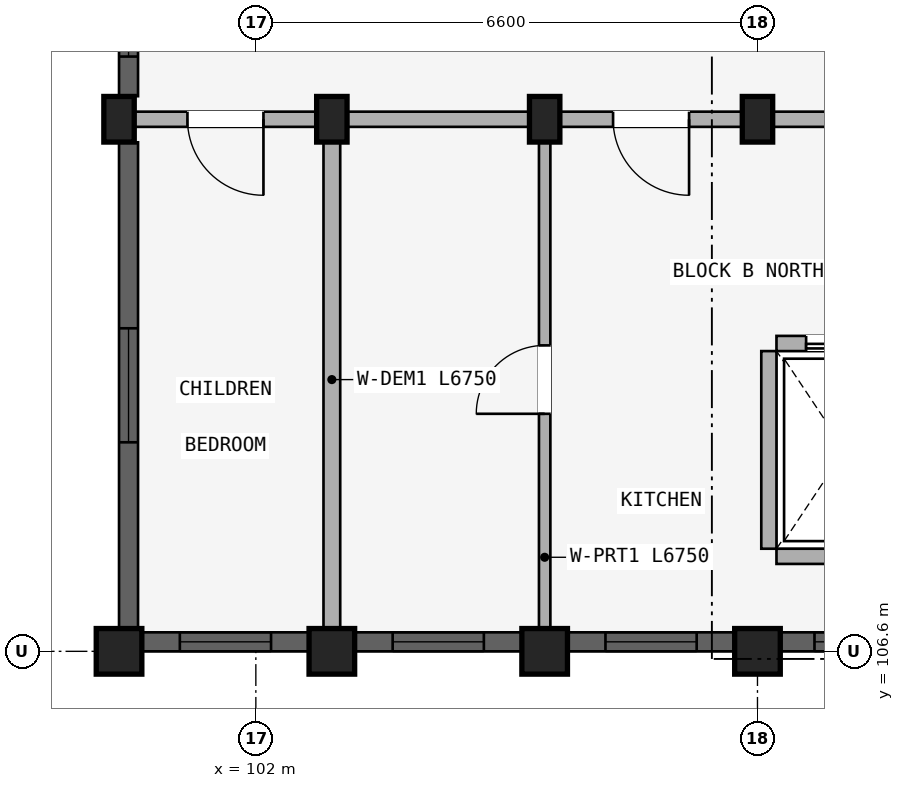
"""IFC4 building model, lengths in metres.
Left out: names, types, materials, properties, quantities, classifications, styles, units other than length and angle.
Written with IfcOpenShell. Run it as: python <this file> out.ifc"""

import sys

from ifc_helpers import new_model, si_unit, direction, frame, frame_2d, origin, origin_2d, place, context, subcontext, project, spatial, rectangle, extrude, element, fill, save


model = new_model("IFC4")
c1 = context("Model", 3, precision=1e-05, world=origin(), true_north=direction((0.0, 1.0)))
c2 = subcontext(c1, "Body", "Model", "MODEL_VIEW")
j1 = project(units=[si_unit("LENGTHUNIT", "METRE"), si_unit("PLANEANGLEUNIT", "RADIAN")], contexts=[c1])
p1 = place(None, origin())
s1 = spatial("IfcSite", under=j1, at=p1, CompositionType="ELEMENT")
p2 = place(p1, origin())
s2 = spatial("IfcBuilding", under=s1, at=p2, CompositionType="ELEMENT")
p3 = place(p2, frame((0.0, 0.0, 40.2)))
s3 = spatial("IfcBuildingStorey", under=s2, at=p3, CompositionType="ELEMENT", Elevation=40.2)
p4 = place(p3, frame((108.6, 106.6, 0.0), z_axis=(0.0, 0.0, 1.0), x_axis=(1.0, 0.0, 0.0)))
e1 = element("IfcColumn", 1, at=p4, inside=s3, PredefinedType="COLUMN", context=c2, shape_type="SweptSolid", body=[
    extrude(rectangle(XDim=0.6, YDim=0.6, at=origin_2d()), origin(), (0.0, 0.0, 1.0), 2.91),
])
p5 = place(p3, frame((108.6, 113.6, 0.0), z_axis=(0.0, 0.0, 1.0), x_axis=(1.0, 0.0, 0.0)))
e2 = element("IfcColumn", 2, at=p5, inside=s3, PredefinedType="COLUMN", context=c2, shape_type="SweptSolid", body=[
    extrude(rectangle(XDim=0.4, YDim=0.6, at=origin_2d()), origin(), (0.0, 0.0, 1.0), 2.91),
])
p6 = place(p3, frame((105.8, 106.6, 0.0), z_axis=(0.0, 0.0, 1.0), x_axis=(1.0, 0.0, 0.0)))
e3 = element("IfcColumn", 3, at=p6, inside=s3, PredefinedType="COLUMN", context=c2, shape_type="SweptSolid", body=[
    extrude(rectangle(XDim=0.6, YDim=0.6, at=origin_2d()), origin(), (0.0, 0.0, 1.0), 2.91),
])
p7 = place(p3, frame((105.8, 113.6, 0.0), z_axis=(0.0, 0.0, 1.0), x_axis=(1.0, 0.0, 0.0)))
e4 = element("IfcColumn", 4, at=p7, inside=s3, PredefinedType="COLUMN", context=c2, shape_type="SweptSolid", body=[
    extrude(rectangle(XDim=0.4, YDim=0.6, at=origin_2d()), origin(), (0.0, 0.0, 1.0), 2.91),
])
p8 = place(p3, frame((103.0, 106.6, 0.0), z_axis=(0.0, 0.0, 1.0), x_axis=(1.0, 0.0, 0.0)))
e5 = element("IfcColumn", 5, at=p8, inside=s3, PredefinedType="COLUMN", context=c2, shape_type="SweptSolid", body=[
    extrude(rectangle(XDim=0.6, YDim=0.6, at=origin_2d()), origin(), (0.0, 0.0, 1.0), 2.91),
])
p9 = place(p3, frame((103.0, 113.6, 0.0), z_axis=(0.0, 0.0, 1.0), x_axis=(1.0, 0.0, 0.0)))
e6 = element("IfcColumn", 6, at=p9, inside=s3, PredefinedType="COLUMN", context=c2, shape_type="SweptSolid", body=[
    extrude(rectangle(XDim=0.4, YDim=0.6, at=origin_2d()), origin(), (0.0, 0.0, 1.0), 2.91),
])
p10 = place(p3, frame((100.2, 106.6, 0.0), z_axis=(0.0, 0.0, 1.0), x_axis=(1.0, 0.0, 0.0)))
e7 = element("IfcColumn", 7, at=p10, inside=s3, PredefinedType="COLUMN", context=c2, shape_type="SweptSolid", body=[
    extrude(rectangle(XDim=0.6, YDim=0.6, at=origin_2d()), origin(), (0.0, 0.0, 1.0), 2.91),
])
p11 = place(p3, frame((100.2, 113.6, 0.0), z_axis=(0.0, 0.0, 1.0), x_axis=(1.0, 0.0, 0.0)))
e8 = element("IfcColumn", 8, at=p11, inside=s3, PredefinedType="COLUMN", context=c2, shape_type="SweptSolid", body=[
    extrude(rectangle(XDim=0.4, YDim=0.6, at=origin_2d()), origin(), (0.0, 0.0, 1.0), 2.91),
])
p12 = place(p3, frame((108.75, 107.95, 0.0), z_axis=(0.0, 0.0, 1.0), x_axis=(0.0, 1.0, 0.0)))
e9 = element("IfcWall", 9, at=p12, inside=s3, PredefinedType="STANDARD", context=c2, shape_type="SweptSolid", body=[
    extrude(rectangle(XDim=2.6, YDim=0.2, at=frame_2d((1.3, 0.0))), origin(), (0.0, 0.0, 1.0), 2.352),
])
p13 = place(p3, frame((110.65, 107.85, 0.0), z_axis=(0.0, 0.0, 1.0), x_axis=(-1.0, 0.0, 0.0)))
e10 = element("IfcWall", 10, at=p13, inside=s3, PredefinedType="STANDARD", context=c2, shape_type="SweptSolid", body=[
    extrude(rectangle(XDim=1.8, YDim=0.2, at=frame_2d((0.9, 0.0))), origin(), (0.0, 0.0, 1.0), 2.91),
])
p14 = place(p3, frame((110.65, 110.65, 0.0), z_axis=(0.0, 0.0, 1.0), x_axis=(-1.0, 0.0, 0.0)))
e11 = element("IfcWall", 11, at=p14, inside=s3, PredefinedType="STANDARD", context=c2, shape_type="SweptSolid", body=[
    extrude(rectangle(XDim=1.8, YDim=0.2, at=frame_2d((0.9, 0.0))), origin(), (0.0, 0.0, 1.0), 2.91),
])
p15 = place(p14, frame((0.39, 0.0, 0.0)))
e12 = element("IfcOpeningElement", 12, at=p15, cuts=e11, PredefinedType="OPENING", context=c2, shape_type="SweptSolid", body=[
    extrude(rectangle(XDim=1.02, YDim=2.15, at=frame_2d((0.51, 1.075))), frame((0.0, 0.11, 0.0), z_axis=(0.0, -1.0, 0.0), x_axis=(1.0, 0.0, 0.0)), (0.0, 0.0, 1.0), 0.22),
])
p16 = place(p3, frame((114.25, 113.6, 0.0), z_axis=(0.0, 0.0, 1.0), x_axis=(-1.0, 0.0, 0.0)))
e13 = element("IfcWall", 13, at=p16, inside=s3, PredefinedType="STANDARD", context=c2, shape_type="SweptSolid", body=[
    extrude(rectangle(XDim=5.6, YDim=0.2, at=frame_2d((2.8, 0.0))), origin(), (0.0, 0.0, 1.0), 2.352),
])
p17 = place(p16, frame((1.91, 0.0, 0.0)))
e14 = element("IfcOpeningElement", 14, at=p17, cuts=e13, PredefinedType="OPENING", context=c2, shape_type="SweptSolid", body=[
    extrude(rectangle(XDim=1.22, YDim=2.15, at=frame_2d((0.61, 1.075))), frame((0.0, 0.11, 0.0), z_axis=(0.0, -1.0, 0.0), x_axis=(1.0, 0.0, 0.0)), (0.0, 0.0, 1.0), 0.22),
])
p18 = place(p3, frame((108.6, 113.6, 0.0), z_axis=(0.0, 0.0, 1.0), x_axis=(-1.0, 0.0, 0.0)))
e15 = element("IfcWall", 15, at=p18, inside=s3, PredefinedType="STANDARD", context=c2, shape_type="SweptSolid", body=[
    extrude(rectangle(XDim=2.8, YDim=0.2, at=frame_2d((1.4, 0.0))), origin(), (0.0, 0.0, 1.0), 2.352),
])
p19 = place(p18, frame((0.9, 0.0, 0.0)))
e16 = element("IfcOpeningElement", 16, at=p19, cuts=e15, PredefinedType="OPENING", context=c2, shape_type="SweptSolid", body=[
    extrude(rectangle(XDim=1.0, YDim=2.15, at=frame_2d((0.5, 1.075))), frame((0.0, 0.11, 0.0), z_axis=(0.0, -1.0, 0.0), x_axis=(1.0, 0.0, 0.0)), (0.0, 0.0, 1.0), 0.22),
])
p20 = place(p3, frame((105.8, 113.6, 0.0), z_axis=(0.0, 0.0, 1.0), x_axis=(-1.0, 0.0, 0.0)))
e17 = element("IfcWall", 17, at=p20, inside=s3, PredefinedType="STANDARD", context=c2, shape_type="SweptSolid", body=[
    extrude(rectangle(XDim=2.8, YDim=0.2, at=frame_2d((1.4, 0.0))), origin(), (0.0, 0.0, 1.0), 2.352),
])
p21 = place(p3, frame((103.0, 113.6, 0.0), z_axis=(0.0, 0.0, 1.0), x_axis=(-1.0, 0.0, 0.0)))
e18 = element("IfcWall", 18, at=p21, inside=s3, PredefinedType="STANDARD", context=c2, shape_type="SweptSolid", body=[
    extrude(rectangle(XDim=2.8, YDim=0.2, at=frame_2d((1.4, 0.0))), origin(), (0.0, 0.0, 1.0), 2.352),
])
p22 = place(p21, frame((0.9, 0.0, 0.0)))
e19 = element("IfcOpeningElement", 19, at=p22, cuts=e18, PredefinedType="OPENING", context=c2, shape_type="SweptSolid", body=[
    extrude(rectangle(XDim=1.0, YDim=2.15, at=frame_2d((0.5, 1.075))), frame((0.0, 0.11, 0.0), z_axis=(0.0, -1.0, 0.0), x_axis=(1.0, 0.0, 0.0)), (0.0, 0.0, 1.0), 0.22),
])
p23 = place(p3, frame((105.8, 106.8, 0.0), z_axis=(0.0, 0.0, 1.0), x_axis=(0.0, 1.0, 0.0)))
e20 = element("IfcWall", 20, at=p23, inside=s3, PredefinedType="PARTITIONING", context=c2, shape_type="SweptSolid", body=[
    extrude(rectangle(XDim=6.75, YDim=0.15, at=frame_2d((3.375, 0.0))), origin(), (0.0, 0.0, 1.0), 2.352),
])
p24 = place(p23, frame((2.925, 0.0, 0.0)))
e21 = element("IfcOpeningElement", 21, at=p24, cuts=e20, PredefinedType="OPENING", context=c2, shape_type="SweptSolid", body=[
    extrude(rectangle(XDim=0.9, YDim=2.1, at=frame_2d((0.45, 1.05))), frame((0.0, 0.085, 0.0), z_axis=(0.0, -1.0, 0.0), x_axis=(1.0, 0.0, 0.0)), (0.0, 0.0, 1.0), 0.17),
])
p25 = place(p3, frame((103.0, 106.8, 0.0), z_axis=(0.0, 0.0, 1.0), x_axis=(0.0, 1.0, 0.0)))
e22 = element("IfcWall", 22, at=p25, inside=s3, PredefinedType="STANDARD", context=c2, shape_type="SweptSolid", body=[
    extrude(rectangle(XDim=6.75, YDim=0.22, at=frame_2d((3.375, 0.0))), origin(), (0.0, 0.0, 1.0), 2.352),
])
p26 = place(p3, frame((111.372, 106.725, 0.0), z_axis=(0.0, 0.0, 1.0), x_axis=(-1.0, 0.0, 0.0)))
e23 = element("IfcWall", 23, at=p26, inside=s3, PredefinedType="STANDARD", context=c2, shape_type="SweptSolid", body=[
    extrude(rectangle(XDim=2.468, YDim=0.25, at=frame_2d((1.234, 0.0))), origin(), (0.0, 0.0, 1.0), 2.452),
])
p27 = place(p26, frame((0.822, 0.0, 0.752)))
e24 = element("IfcOpeningElement", 24, at=p27, cuts=e23, PredefinedType="OPENING", context=c2, shape_type="SweptSolid", body=[
    extrude(rectangle(XDim=1.2, YDim=1.5, at=frame_2d((0.6, 0.75))), frame((0.0, 0.135, 0.0), z_axis=(0.0, -1.0, 0.0), x_axis=(1.0, 0.0, 0.0)), (0.0, 0.0, 1.0), 0.27),
])
p28 = place(p3, frame((108.296, 106.725, 0.0), z_axis=(0.0, 0.0, 1.0), x_axis=(-1.0, 0.0, 0.0)))
e25 = element("IfcWall", 25, at=p28, inside=s3, PredefinedType="STANDARD", context=c2, shape_type="SweptSolid", body=[
    extrude(rectangle(XDim=2.193, YDim=0.25, at=frame_2d((1.096, 0.0))), origin(), (0.0, 0.0, 1.0), 2.452),
])
p29 = place(p28, frame((0.497, 0.0, 0.752)))
e26 = element("IfcOpeningElement", 26, at=p29, cuts=e25, PredefinedType="OPENING", context=c2, shape_type="SweptSolid", body=[
    extrude(rectangle(XDim=1.2, YDim=1.5, at=frame_2d((0.6, 0.75))), frame((0.0, 0.135, 0.0), z_axis=(0.0, -1.0, 0.0), x_axis=(1.0, 0.0, 0.0)), (0.0, 0.0, 1.0), 0.27),
])
p30 = place(p3, frame((105.497, 106.725, 0.0), z_axis=(0.0, 0.0, 1.0), x_axis=(-1.0, 0.0, 0.0)))
e27 = element("IfcWall", 27, at=p30, inside=s3, PredefinedType="STANDARD", context=c2, shape_type="SweptSolid", body=[
    extrude(rectangle(XDim=2.193, YDim=0.25, at=frame_2d((1.097, 0.0))), origin(), (0.0, 0.0, 1.0), 2.452),
])
p31 = place(p30, frame((0.497, 0.0, 0.752)))
e28 = element("IfcOpeningElement", 28, at=p31, cuts=e27, PredefinedType="OPENING", context=c2, shape_type="SweptSolid", body=[
    extrude(rectangle(XDim=1.2, YDim=1.5, at=frame_2d((0.6, 0.75))), frame((0.0, 0.135, 0.0), z_axis=(0.0, -1.0, 0.0), x_axis=(1.0, 0.0, 0.0)), (0.0, 0.0, 1.0), 0.27),
])
p32 = place(p3, frame((102.697, 106.725, 0.0), z_axis=(0.0, 0.0, 1.0), x_axis=(-1.0, 0.0, 0.0)))
e29 = element("IfcWall", 29, at=p32, inside=s3, PredefinedType="STANDARD", context=c2, shape_type="SweptSolid", body=[
    extrude(rectangle(XDim=2.193, YDim=0.25, at=frame_2d((1.097, 0.0))), origin(), (0.0, 0.0, 1.0), 2.452),
])
p33 = place(p32, frame((0.497, 0.0, 0.752)))
e30 = element("IfcOpeningElement", 30, at=p33, cuts=e29, PredefinedType="OPENING", context=c2, shape_type="SweptSolid", body=[
    extrude(rectangle(XDim=1.2, YDim=1.5, at=frame_2d((0.6, 0.75))), frame((0.0, 0.135, 0.0), z_axis=(0.0, -1.0, 0.0), x_axis=(1.0, 0.0, 0.0)), (0.0, 0.0, 1.0), 0.27),
])
p34 = place(p3, frame((100.325, 106.904, 0.0), z_axis=(0.0, 0.0, 1.0), x_axis=(0.0, 1.0, 0.0)))
e31 = element("IfcWall", 31, at=p34, inside=s3, PredefinedType="STANDARD", context=c2, shape_type="SweptSolid", body=[
    extrude(rectangle(XDim=6.393, YDim=0.25, at=frame_2d((3.196, 0.0))), origin(), (0.0, 0.0, 1.0), 2.352),
])
p35 = place(p34, frame((2.447, 0.0, 0.502)))
e32 = element("IfcOpeningElement", 32, at=p35, cuts=e31, PredefinedType="OPENING", context=c2, shape_type="SweptSolid", body=[
    extrude(rectangle(XDim=1.5, YDim=1.65, at=frame_2d((0.75, 0.825))), frame((0.0, 0.135, 0.0), z_axis=(0.0, -1.0, 0.0), x_axis=(1.0, 0.0, 0.0)), (0.0, 0.0, 1.0), 0.27),
])
p36 = place(p3, frame((100.325, 113.904, 0.0), z_axis=(0.0, 0.0, 1.0), x_axis=(0.0, 1.0, 0.0)))
e33 = element("IfcWall", 33, at=p36, inside=s3, PredefinedType="STANDARD", context=c2, shape_type="SweptSolid", body=[
    extrude(rectangle(XDim=1.793, YDim=0.25, at=frame_2d((0.896, 0.0))), origin(), (0.0, 0.0, 1.0), 2.352),
])
p37 = place(p36, frame((0.521, 0.0, 0.88)))
e34 = element("IfcOpeningElement", 34, at=p37, cuts=e33, PredefinedType="OPENING", context=c2, shape_type="SweptSolid", body=[
    extrude(rectangle(XDim=0.75, YDim=1.05, at=frame_2d((0.375, 0.525))), frame((0.0, 0.135, 0.0), z_axis=(0.0, -1.0, 0.0), x_axis=(1.0, 0.0, 0.0)), (0.0, 0.0, 1.0), 0.27),
])
p38 = place(p27, origin())
e35 = element("IfcWindow", 35, at=p38, inside=s3, PartitioningType="SINGLE_PANEL", PredefinedType="WINDOW", context=c2, shape_type="SweptSolid", body=[
    extrude(rectangle(XDim=1.2, YDim=1.5, at=frame_2d((0.6, 0.75))), frame((0.0, 0.03, 0.0), z_axis=(0.0, -1.0, 0.0), x_axis=(1.0, 0.0, 0.0)), (0.0, 0.0, 1.0), 0.06),
])
fill(e24, e35)
p39 = place(p29, origin())
e36 = element("IfcWindow", 36, at=p39, inside=s3, PartitioningType="SINGLE_PANEL", PredefinedType="WINDOW", context=c2, shape_type="SweptSolid", body=[
    extrude(rectangle(XDim=1.2, YDim=1.5, at=frame_2d((0.6, 0.75))), frame((0.0, 0.03, 0.0), z_axis=(0.0, -1.0, 0.0), x_axis=(1.0, 0.0, 0.0)), (0.0, 0.0, 1.0), 0.06),
])
fill(e26, e36)
p40 = place(p31, origin())
e37 = element("IfcWindow", 37, at=p40, inside=s3, PartitioningType="SINGLE_PANEL", PredefinedType="WINDOW", context=c2, shape_type="SweptSolid", body=[
    extrude(rectangle(XDim=1.2, YDim=1.5, at=frame_2d((0.6, 0.75))), frame((0.0, 0.03, 0.0), z_axis=(0.0, -1.0, 0.0), x_axis=(1.0, 0.0, 0.0)), (0.0, 0.0, 1.0), 0.06),
])
fill(e28, e37)
p41 = place(p33, origin())
e38 = element("IfcWindow", 38, at=p41, inside=s3, PartitioningType="SINGLE_PANEL", PredefinedType="WINDOW", context=c2, shape_type="SweptSolid", body=[
    extrude(rectangle(XDim=1.2, YDim=1.5, at=frame_2d((0.6, 0.75))), frame((0.0, 0.03, 0.0), z_axis=(0.0, -1.0, 0.0), x_axis=(1.0, 0.0, 0.0)), (0.0, 0.0, 1.0), 0.06),
])
fill(e30, e38)
p42 = place(p35, origin())
e39 = element("IfcWindow", 39, at=p42, inside=s3, PartitioningType="DOUBLE_PANEL_VERTICAL", PredefinedType="WINDOW", context=c2, shape_type="SweptSolid", body=[
    extrude(rectangle(XDim=1.5, YDim=1.65, at=frame_2d((0.75, 0.825))), frame((0.0, 0.03, 0.0), z_axis=(0.0, -1.0, 0.0), x_axis=(1.0, 0.0, 0.0)), (0.0, 0.0, 1.0), 0.06),
])
fill(e32, e39)
p43 = place(p37, origin())
e40 = element("IfcWindow", 40, at=p43, inside=s3, PartitioningType="SINGLE_PANEL", PredefinedType="WINDOW", context=c2, shape_type="SweptSolid", body=[
    extrude(rectangle(XDim=0.75, YDim=1.05, at=frame_2d((0.375, 0.525))), frame((0.0, 0.03, 0.0), z_axis=(0.0, -1.0, 0.0), x_axis=(1.0, 0.0, 0.0)), (0.0, 0.0, 1.0), 0.06),
])
fill(e34, e40)
p44 = place(p15, origin())
e41 = element("IfcDoor", 41, at=p44, inside=s3, OperationType="SLIDING_TO_RIGHT", PredefinedType="DOOR", context=c2, shape_type="SweptSolid", body=[
    extrude(rectangle(XDim=1.02, YDim=2.15, at=frame_2d((0.51, 1.075))), frame((0.0, 0.025, 0.0), z_axis=(0.0, -1.0, 0.0), x_axis=(1.0, 0.0, 0.0)), (0.0, 0.0, 1.0), 0.05),
])
fill(e12, e41)
p45 = place(p19, frame((1.0, 0.0, 0.0), z_axis=(0.0, 0.0, 1.0), x_axis=(-1.0, 0.0, 0.0)))
e42 = element("IfcDoor", 42, at=p45, inside=s3, OperationType="SINGLE_SWING_RIGHT", PredefinedType="DOOR", context=c2, shape_type="SweptSolid", body=[
    extrude(rectangle(XDim=1.0, YDim=2.15, at=frame_2d((0.5, 1.075))), frame((0.0, 0.025, 0.0), z_axis=(0.0, -1.0, 0.0), x_axis=(1.0, 0.0, 0.0)), (0.0, 0.0, 1.0), 0.05),
])
fill(e16, e42)
p46 = place(p22, frame((1.0, 0.0, 0.0), z_axis=(0.0, 0.0, 1.0), x_axis=(-1.0, 0.0, 0.0)))
e43 = element("IfcDoor", 43, at=p46, inside=s3, OperationType="SINGLE_SWING_RIGHT", PredefinedType="DOOR", context=c2, shape_type="SweptSolid", body=[
    extrude(rectangle(XDim=1.0, YDim=2.15, at=frame_2d((0.5, 1.075))), frame((0.0, 0.025, 0.0), z_axis=(0.0, -1.0, 0.0), x_axis=(1.0, 0.0, 0.0)), (0.0, 0.0, 1.0), 0.05),
])
fill(e19, e43)
p47 = place(p24, frame((0.9, 0.0, 0.0), z_axis=(0.0, 0.0, 1.0), x_axis=(-1.0, 0.0, 0.0)))
e44 = element("IfcDoor", 44, at=p47, inside=s3, OperationType="SINGLE_SWING_RIGHT", PredefinedType="DOOR", context=c2, shape_type="SweptSolid", body=[
    extrude(rectangle(XDim=0.9, YDim=2.1, at=frame_2d((0.45, 1.05))), frame((0.0, 0.025, 0.0), z_axis=(0.0, -1.0, 0.0), x_axis=(1.0, 0.0, 0.0)), (0.0, 0.0, 1.0), 0.05),
])
fill(e21, e44)
save(model, sys.argv[1])
